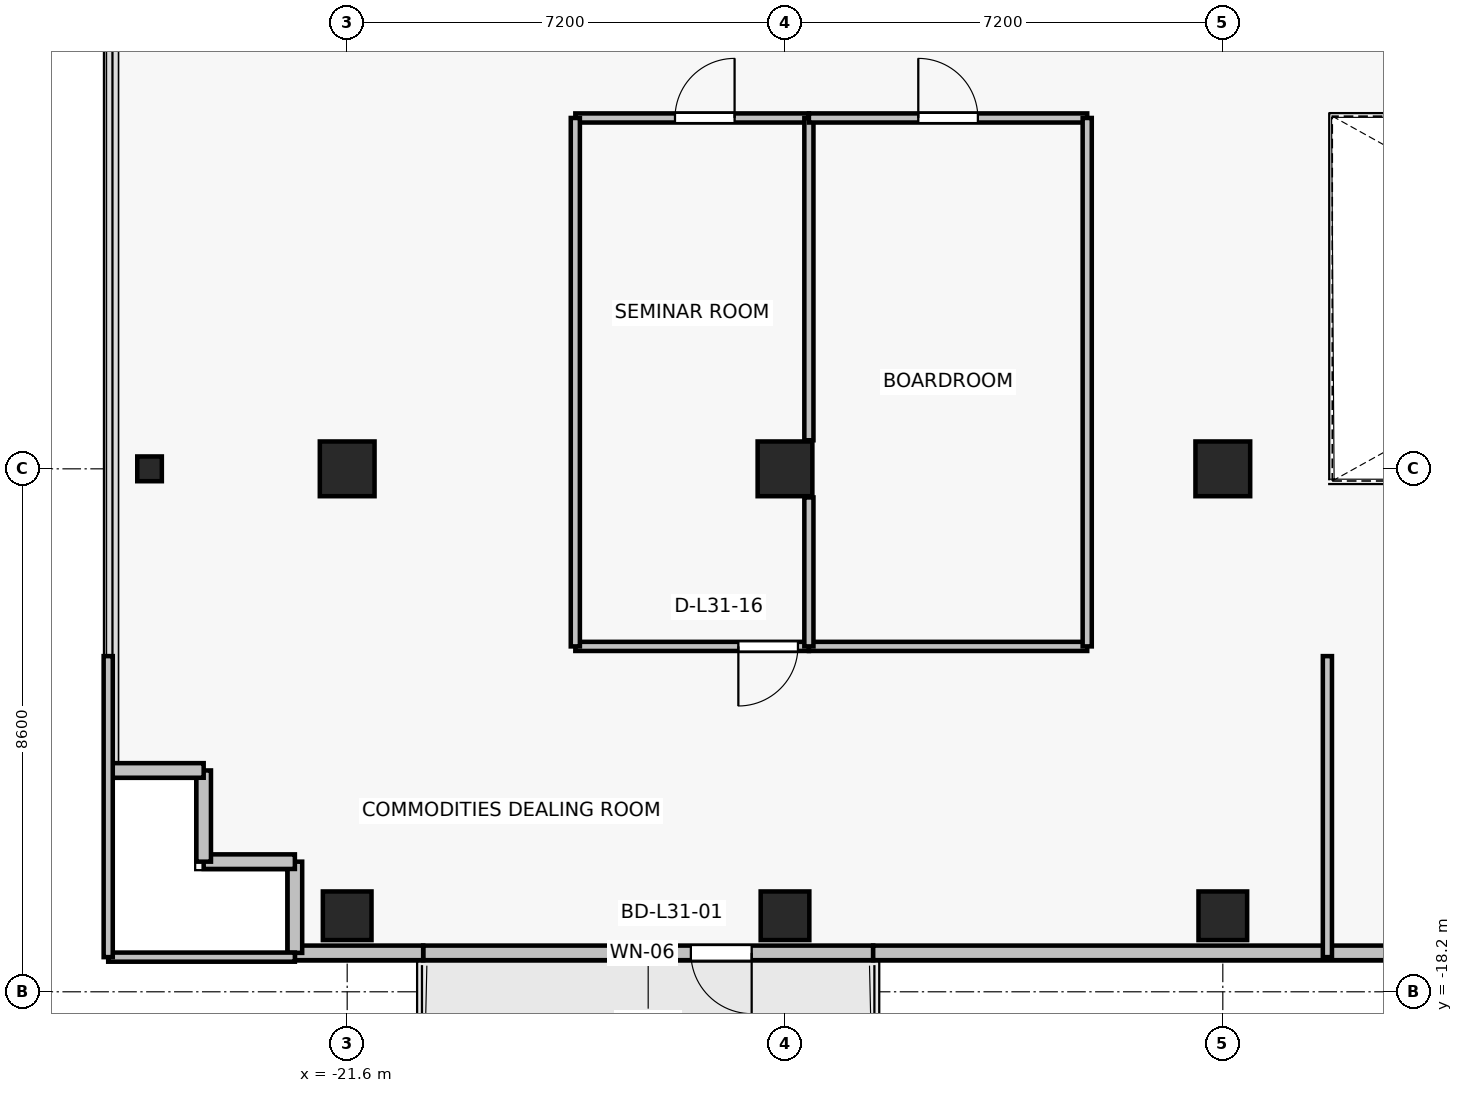
"""IFC4 building model, lengths in metres.
Left out: names, types, materials, properties, quantities, classifications, styles, units other than length and angle.
Written with IfcOpenShell. Run it as: python <this file> out.ifc"""

import sys

from ifc_helpers import new_model, si_unit, direction, frame, frame_2d, origin, origin_2d, place, context, subcontext, project, spatial, rectangle, i_section, extrude, source, transform, mapped, element, fill, save


model = new_model("IFC4")
c1 = context("Model", 3, precision=1e-05, world=origin(), true_north=direction((0.0, 1.0)))
c2 = subcontext(c1, "Body", "Model", "MODEL_VIEW")
j1 = project(units=[si_unit("LENGTHUNIT", "METRE"), si_unit("PLANEANGLEUNIT", "RADIAN")], contexts=[c1])
p1 = place(None, origin())
s1 = spatial("IfcSite", under=j1, at=p1, CompositionType="ELEMENT")
p2 = place(p1, origin())
s2 = spatial("IfcBuilding", under=s1, at=p2, CompositionType="ELEMENT")
p3 = place(p2, frame((0.0, 0.0, 113.2)))
s3 = spatial("IfcBuildingStorey", under=s2, at=p3, CompositionType="ELEMENT", Elevation=113.2)
for number, where, z_axis, x_axis in (
    (1, (-14.4, -9.6, 0.0), (0.0, 0.0, 1.0), (1.0, 0.0, 0.0)),
    (2, (-7.2, -9.6, 0.0), (0.0, 0.0, 1.0), (1.0, 0.0, 0.0)),
    (3, (-21.6, -9.6, 0.0), (0.0, 0.0, 1.0), (1.0, 0.0, 0.0)),
):
    element("IfcColumn", number, at=place(p3, frame(where, z_axis=z_axis, x_axis=x_axis)), inside=s3, PredefinedType="COLUMN", context=c2, shape_type="SweptSolid", body=[
        extrude(rectangle(XDim=0.9, YDim=0.9, at=origin_2d()), origin(), (0.0, 0.0, 1.0), 3.3),
    ])
for number, where, z_axis, x_axis in (
    (4, (-14.4, -16.95, 0.0), (0.0, 0.0, 1.0), (1.0, 0.0, 0.0)),
    (5, (-7.2, -16.95, 0.0), (0.0, 0.0, 1.0), (1.0, 0.0, 0.0)),
    (6, (-21.6, -16.95, 0.0), (0.0, 0.0, 1.0), (1.0, 0.0, 0.0)),
):
    element("IfcColumn", number, at=place(p3, frame(where, z_axis=z_axis, x_axis=x_axis)), inside=s3, PredefinedType="COLUMN", context=c2, shape_type="SweptSolid", body=[
        extrude(rectangle(XDim=0.8, YDim=0.8, at=origin_2d()), origin(), (0.0, 0.0, 1.0), 3.3),
    ])
p4 = place(p3, frame((-24.85, -9.6, 0.0), z_axis=(0.0, 0.0, 1.0), x_axis=(1.0, 0.0, 0.0)))
e7 = element("IfcColumn", 7, at=p4, inside=s3, PredefinedType="COLUMN", context=c2, shape_type="SweptSolid", body=[
    extrude(i_section(OverallWidth=0.404, OverallDepth=0.407, WebThickness=0.022, FlangeThickness=0.032, FilletRadius=0.015, at=origin_2d()), origin(), (0.0, 0.0, 1.0), 3.3),
])
p5 = place(p3, frame((-12.95, -17.56, 0.0), z_axis=(0.0, 0.0, 1.0), x_axis=(-1.0, 0.0, 0.0)))
e8 = element("IfcWall", 8, at=p5, inside=s3, PredefinedType="SOLIDWALL", context=c2, shape_type="SweptSolid", body=[
    extrude(rectangle(XDim=7.4, YDim=0.24, at=frame_2d((3.7, 0.0))), origin(), (0.0, 0.0, 1.0), 2.665),
])
p6 = place(p5, frame((1.998, 0.0, 0.0)))
e9 = element("IfcOpeningElement", 9, at=p6, cuts=e8, PredefinedType="OPENING", context=c2, shape_type="SweptSolid", body=[
    extrude(rectangle(XDim=1.0, YDim=2.2, at=frame_2d((0.5, 1.1))), frame((0.0, 0.13, 0.0), z_axis=(0.0, -1.0, 0.0), x_axis=(1.0, 0.0, 0.0)), (0.0, 0.0, 1.0), 0.26),
])
p7 = place(p5, frame((3.348, 0.0, 0.85)))
e10 = element("IfcOpeningElement", 10, at=p7, cuts=e8, PredefinedType="OPENING", context=c2, shape_type="SweptSolid", body=[
    extrude(rectangle(XDim=0.9, YDim=1.35, at=frame_2d((0.45, 0.675))), frame((0.0, 0.13, 0.0), z_axis=(0.0, -1.0, 0.0), x_axis=(1.0, 0.0, 0.0)), (0.0, 0.0, 1.0), 0.26),
])
p8 = place(p3, frame((-12.95, -17.56, 0.0), z_axis=(0.0, 0.0, 1.0), x_axis=(1.0, 0.0, 0.0)))
e11 = element("IfcWall", 11, at=p8, inside=s3, PredefinedType="SOLIDWALL", context=c2, shape_type="SweptSolid", body=[
    extrude(rectangle(XDim=9.61, YDim=0.24, at=frame_2d((4.805, 0.0))), origin(), (0.0, 0.0, 1.0), 2.665),
])
p9 = place(p3, frame((-22.46, -17.56, 0.0), z_axis=(0.0, 0.0, 1.0), x_axis=(1.0, 0.0, 0.0)))
e12 = element("IfcWall", 12, at=p9, inside=s3, PredefinedType="SOLIDWALL", context=c2, shape_type="SweptSolid", body=[
    extrude(rectangle(XDim=2.11, YDim=0.24, at=frame_2d((1.055, 0.0))), origin(), (0.0, 0.0, 1.0), 3.075),
])
p10 = place(p3, frame((-22.46, -16.06, 0.0), z_axis=(0.0, 0.0, 1.0), x_axis=(0.0, -1.0, 0.0)))
e13 = element("IfcWall", 13, at=p10, inside=s3, PredefinedType="SOLIDWALL", context=c2, shape_type="SweptSolid", body=[
    extrude(rectangle(XDim=1.5, YDim=0.24, at=frame_2d((0.75, 0.0))), origin(), (0.0, 0.0, 1.0), 2.565),
])
for number, where, z_axis, x_axis in (
    (14, (-23.96, -16.06, 0.0), (0.0, 0.0, 1.0), (1.0, 0.0, 0.0)),
    (15, (-23.96, -14.56, 0.0), (0.0, 0.0, 1.0), (0.0, -1.0, 0.0)),
    (16, (-25.46, -14.56, 0.0), (0.0, 0.0, 1.0), (1.0, 0.0, 0.0)),
):
    element("IfcWall", number, at=place(p3, frame(where, z_axis=z_axis, x_axis=x_axis)), inside=s3, PredefinedType="SOLIDWALL", context=c2, shape_type="SweptSolid", body=[
        extrude(rectangle(XDim=1.5, YDim=0.24, at=frame_2d((0.75, 0.0))), origin(), (0.0, 0.0, 1.0), 3.075),
    ])
p11 = place(p3, frame((-14.007, -12.52, 0.0), z_axis=(0.0, 0.0, 1.0), x_axis=(-1.0, 0.0, 0.0)))
e17 = element("IfcWall", 17, at=p11, inside=s3, PredefinedType="PARTITIONING", context=c2, shape_type="SweptSolid", body=[
    extrude(rectangle(XDim=3.841, YDim=0.15, at=frame_2d((1.92, 0.0))), origin(), (0.0, 0.0, 1.0), 2.515),
])
p12 = place(p11, frame((0.18, 0.0, 0.0)))
e18 = element("IfcOpeningElement", 18, at=p12, cuts=e17, PredefinedType="OPENING", context=c2, shape_type="SweptSolid", body=[
    extrude(rectangle(XDim=0.98, YDim=2.15, at=frame_2d((0.49, 1.075))), frame((0.0, 0.085, 0.0), z_axis=(0.0, -1.0, 0.0), x_axis=(1.0, 0.0, 0.0)), (0.0, 0.0, 1.0), 0.17),
])
p13 = place(p3, frame((-17.848, -3.83, 0.0), z_axis=(0.0, 0.0, 1.0), x_axis=(1.0, 0.0, 0.0)))
e19 = element("IfcWall", 19, at=p13, inside=s3, PredefinedType="PARTITIONING", context=c2, shape_type="SweptSolid", body=[
    extrude(rectangle(XDim=3.841, YDim=0.15, at=frame_2d((1.92, 0.0))), origin(), (0.0, 0.0, 1.0), 2.515),
])
p14 = place(p13, frame((1.639, 0.0, 0.0)))
e20 = element("IfcOpeningElement", 20, at=p14, cuts=e19, PredefinedType="OPENING", context=c2, shape_type="SweptSolid", body=[
    extrude(rectangle(XDim=0.98, YDim=2.15, at=frame_2d((0.49, 1.075))), frame((0.0, 0.085, 0.0), z_axis=(0.0, -1.0, 0.0), x_axis=(1.0, 0.0, 0.0)), (0.0, 0.0, 1.0), 0.17),
])
p15 = place(p3, frame((-17.848, -12.52, 0.0), z_axis=(0.0, 0.0, 1.0), x_axis=(0.0, 1.0, 0.0)))
e21 = element("IfcWall", 21, at=p15, inside=s3, PredefinedType="PARTITIONING", context=c2, shape_type="SweptSolid", body=[
    extrude(rectangle(XDim=8.69, YDim=0.15, at=frame_2d((4.345, 0.0))), origin(), (0.0, 0.0, 1.0), 2.515),
])
p16 = place(p3, frame((-14.007, -3.83, 0.0), z_axis=(0.0, 0.0, 1.0), x_axis=(0.0, -1.0, 0.0)))
e22 = element("IfcWall", 22, at=p16, inside=s3, PredefinedType="PARTITIONING", context=c2, shape_type="SweptSolid", body=[
    extrude(rectangle(XDim=5.3, YDim=0.15, at=frame_2d((2.65, 0.0))), origin(), (0.0, 0.0, 1.0), 2.615),
])
p17 = place(p3, frame((-9.43, -12.52, 0.0), z_axis=(0.0, 0.0, 1.0), x_axis=(-1.0, 0.0, 0.0)))
e23 = element("IfcWall", 23, at=p17, inside=s3, PredefinedType="PARTITIONING", context=c2, shape_type="SweptSolid", body=[
    extrude(rectangle(XDim=4.577, YDim=0.15, at=frame_2d((2.289, 0.0))), origin(), (0.0, 0.0, 1.0), 2.665),
])
p18 = place(p3, frame((-14.007, -3.83, 0.0), z_axis=(0.0, 0.0, 1.0), x_axis=(1.0, 0.0, 0.0)))
e24 = element("IfcWall", 24, at=p18, inside=s3, PredefinedType="PARTITIONING", context=c2, shape_type="SweptSolid", body=[
    extrude(rectangle(XDim=4.577, YDim=0.15, at=frame_2d((2.289, 0.0))), origin(), (0.0, 0.0, 1.0), 3.075),
])
p19 = place(p18, frame((1.799, 0.0, 0.0)))
e25 = element("IfcOpeningElement", 25, at=p19, cuts=e24, PredefinedType="OPENING", context=c2, shape_type="SweptSolid", body=[
    extrude(rectangle(XDim=0.98, YDim=2.15, at=frame_2d((0.49, 1.075))), frame((0.0, 0.085, 0.0), z_axis=(0.0, -1.0, 0.0), x_axis=(1.0, 0.0, 0.0)), (0.0, 0.0, 1.0), 0.17),
])
p20 = place(p3, frame((-14.007, -12.52, 0.0), z_axis=(0.0, 0.0, 1.0), x_axis=(0.0, 1.0, 0.0)))
e26 = element("IfcWall", 26, at=p20, inside=s3, PredefinedType="PARTITIONING", context=c2, shape_type="SweptSolid", body=[
    extrude(rectangle(XDim=2.45, YDim=0.15, at=frame_2d((1.225, 0.0))), origin(), (0.0, 0.0, 1.0), 3.075),
])
p21 = place(p3, frame((-9.43, -3.83, 0.0), z_axis=(0.0, 0.0, 1.0), x_axis=(0.0, -1.0, 0.0)))
e27 = element("IfcWall", 27, at=p21, inside=s3, PredefinedType="PARTITIONING", context=c2, shape_type="SweptSolid", body=[
    extrude(rectangle(XDim=8.69, YDim=0.15, at=frame_2d((4.345, 0.0))), origin(), (0.0, 0.0, 1.0), 2.515),
])
p22 = place(p3, frame((-22.46, -17.63, 0.0), z_axis=(0.0, 0.0, 1.0), x_axis=(-1.0, 0.0, 0.0)))
e28 = element("IfcWall", 28, at=p22, inside=s3, PredefinedType="PARTITIONING", context=c2, shape_type="SweptSolid", body=[
    extrude(rectangle(XDim=3.07, YDim=0.15, at=frame_2d((1.535, 0.0))), origin(), (0.0, 0.0, 1.0), 2.665),
])
p23 = place(p3, frame((-25.53, -17.63, 0.0), z_axis=(0.0, 0.0, 1.0), x_axis=(0.0, 1.0, 0.0)))
e29 = element("IfcWall", 29, at=p23, inside=s3, PredefinedType="PARTITIONING", context=c2, shape_type="SweptSolid", body=[
    extrude(rectangle(XDim=4.95, YDim=0.15, at=frame_2d((2.475, 0.0))), origin(), (0.0, 0.0, 1.0), 3.075),
])
p24 = place(p3, frame((-5.48, -12.68, 0.0), z_axis=(0.0, 0.0, 1.0), x_axis=(0.0, -1.0, 0.0)))
e30 = element("IfcWall", 30, at=p24, inside=s3, PredefinedType="PARTITIONING", context=c2, shape_type="SweptSolid", body=[
    extrude(rectangle(XDim=4.95, YDim=0.15, at=frame_2d((2.475, 0.0))), origin(), (0.0, 0.0, 1.0), 2.565),
])
m1 = source(origin(), c2, "Body", "SweptSolid", [
    extrude(rectangle(XDim=1.0, YDim=2.2, at=frame_2d((0.5, 1.1))), frame((0.0, 0.025, 0.0), z_axis=(0.0, -1.0, 0.0), x_axis=(1.0, 0.0, 0.0)), (0.0, 0.0, 1.0), 0.05),
])
p25 = place(p6, origin())
e31 = element("IfcDoor", 31, at=p25, inside=s3, OperationType="SINGLE_SWING_LEFT", PredefinedType="DOOR", context=c2, shape_type="MappedRepresentation", body=[
    mapped(m1, transform((0.0, 0.0, 0.0), x_axis=(1.0, 0.0, 0.0), y_axis=(0.0, 1.0, 0.0), z_axis=(0.0, 0.0, 1.0), scale=1.0)),
])
fill(e9, e31)
m2 = source(origin(), c2, "Body", "SweptSolid", [
    extrude(rectangle(XDim=0.9, YDim=1.35, at=frame_2d((0.45, 0.675))), frame((0.0, 0.03, 0.0), z_axis=(0.0, -1.0, 0.0), x_axis=(1.0, 0.0, 0.0)), (0.0, 0.0, 1.0), 0.06),
])
p26 = place(p7, origin())
e32 = element("IfcWindow", 32, at=p26, inside=s3, PartitioningType="SINGLE_PANEL", PredefinedType="WINDOW", context=c2, shape_type="MappedRepresentation", body=[
    mapped(m2, transform((0.0, 0.0, 0.0), x_axis=(1.0, 0.0, 0.0), y_axis=(0.0, 1.0, 0.0), z_axis=(0.0, 0.0, 1.0), scale=1.0)),
])
fill(e10, e32)
m3 = source(origin(), c2, "Body", "SweptSolid", [
    extrude(rectangle(XDim=0.98, YDim=2.15, at=frame_2d((0.49, 1.075))), frame((0.0, 0.025, 0.0), z_axis=(0.0, -1.0, 0.0), x_axis=(1.0, 0.0, 0.0)), (0.0, 0.0, 1.0), 0.05),
])
p27 = place(p14, origin())
e33 = element("IfcDoor", 33, at=p27, inside=s3, OperationType="SINGLE_SWING_RIGHT", PredefinedType="DOOR", context=c2, shape_type="MappedRepresentation", body=[
    mapped(m3, transform((0.0, 0.0, 0.0), x_axis=(1.0, 0.0, 0.0), y_axis=(0.0, 1.0, 0.0), z_axis=(0.0, 0.0, 1.0), scale=1.0)),
])
fill(e20, e33)
p28 = place(p19, origin())
e34 = element("IfcDoor", 34, at=p28, inside=s3, OperationType="SINGLE_SWING_LEFT", PredefinedType="DOOR", context=c2, shape_type="MappedRepresentation", body=[
    mapped(m3, transform((0.0, 0.0, 0.0), x_axis=(1.0, 0.0, 0.0), y_axis=(0.0, 1.0, 0.0), z_axis=(0.0, 0.0, 1.0), scale=1.0)),
])
fill(e25, e34)
p29 = place(p12, origin())
e35 = element("IfcDoor", 35, at=p29, inside=s3, OperationType="SINGLE_SWING_RIGHT", PredefinedType="DOOR", context=c2, shape_type="MappedRepresentation", body=[
    mapped(m3, transform((0.0, 0.0, 0.0), x_axis=(1.0, 0.0, 0.0), y_axis=(0.0, 1.0, 0.0), z_axis=(0.0, 0.0, 1.0), scale=1.0)),
])
fill(e18, e35)
save(model, sys.argv[1])
